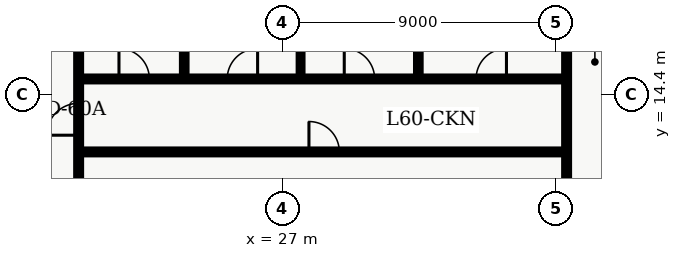
"""IFC4 building model, lengths in metres.
Left out: names, types, materials, properties, quantities, classifications, styles, units other than length and angle.
Written with IfcOpenShell. Run it as: python <this file> out.ifc"""

import sys

from ifc_helpers import new_model, entity, si_unit, converted_unit, direction, frame, origin_with_axes, origin_2d_with_axis, place, context, subcontext, project, spatial, polyline, rectangle, outline, extrude, element, fill, save


model = new_model("IFC4")
c1 = context("Model", 3, precision=1e-05, world=origin_with_axes(), true_north=direction((0.0, 1.0)))
c2 = subcontext(c1, "Body", "Model", "MODEL_VIEW")
j1 = project(units=[si_unit("LENGTHUNIT", "METRE"), converted_unit("PLANEANGLEUNIT", "DEGREE", entity("IfcPlaneAngleMeasure", 0.017), si_unit("PLANEANGLEUNIT", "RADIAN"), dimensions=[0, 0, 0, 0, 0, 0, 0])], contexts=[c1])
p1 = place(None, origin_with_axes())
s1 = spatial("IfcSite", under=j1, at=p1, CompositionType="ELEMENT")
p2 = place(p1, origin_with_axes())
s2 = spatial("IfcBuilding", under=s1, at=p2, CompositionType="ELEMENT")
p3 = place(p2, frame((0.0, 0.0, 244.2), z_axis=(0.0, 0.0, 1.0), x_axis=(1.0, 0.0, 0.0)))
s3 = spatial("IfcBuildingStorey", under=s2, at=p3, CompositionType="ELEMENT", Elevation=244.2)
p4 = place(p3, frame((20.3, 7.8, 0.0), z_axis=(0.0, 0.0, 1.0), x_axis=(0.0, 1.0, 0.0)))
e1 = element("IfcWall", 1, at=p4, inside=s3, PredefinedType="PARTITIONING", context=c2, shape_type="SweptSolid", body=[
    extrude(outline(polyline([(0.0, -0.08), (32.7, -0.08), (32.7, 0.08), (0.0, 0.08), (0.0, -0.08)])), origin_with_axes(), (0.0, 0.0, 1.0), 2.64),
])
p5 = place(p4, frame((17.794, 0.0, 0.0), z_axis=(0.0, 0.0, 1.0), x_axis=(1.0, 0.0, 0.0)))
e2 = element("IfcOpeningElement", 2, at=p5, cuts=e1, PredefinedType="OPENING", context=c2, shape_type="SweptSolid", body=[
    extrude(rectangle(XDim=1.0, YDim=0.18, at=origin_2d_with_axis()), origin_with_axes(), (0.0, 0.0, 1.0), 2.15),
])
p6 = place(p4, frame((22.145, 0.0, 0.0), z_axis=(0.0, 0.0, 1.0), x_axis=(1.0, 0.0, 0.0)))
e3 = element("IfcOpeningElement", 3, at=p6, cuts=e1, PredefinedType="OPENING", context=c2, shape_type="SweptSolid", body=[
    extrude(rectangle(XDim=1.0, YDim=0.18, at=origin_2d_with_axis()), origin_with_axes(), (0.0, 0.0, 1.0), 2.15),
])
p7 = place(p4, frame((26.855, 0.0, 0.0), z_axis=(0.0, 0.0, 1.0), x_axis=(1.0, 0.0, 0.0)))
e4 = element("IfcOpeningElement", 4, at=p7, cuts=e1, PredefinedType="OPENING", context=c2, shape_type="SweptSolid", body=[
    extrude(rectangle(XDim=1.0, YDim=0.18, at=origin_2d_with_axis()), origin_with_axes(), (0.0, 0.0, 1.0), 2.15),
])
p8 = place(p4, frame((5.775, 0.0, 0.0), z_axis=(0.0, 0.0, 1.0), x_axis=(1.0, 0.0, 0.0)))
e5 = element("IfcOpeningElement", 5, at=p8, cuts=e1, PredefinedType="OPENING", context=c2, shape_type="SweptSolid", body=[
    extrude(rectangle(XDim=1.05, YDim=0.18, at=origin_2d_with_axis()), origin_with_axes(), (0.0, 0.0, 1.0), 2.15),
])
p9 = place(p3, frame((20.3, 12.5, 0.0), z_axis=(0.0, 0.0, 1.0), x_axis=(1.0, 0.0, 0.0)))
e6 = element("IfcWall", 6, at=p9, inside=s3, PredefinedType="PARTITIONING", context=c2, shape_type="SweptSolid", body=[
    extrude(outline(polyline([(0.0, -0.08), (16.05, -0.08), (16.05, 0.08), (0.0, 0.08), (0.0, -0.08)])), origin_with_axes(), (0.0, 0.0, 1.0), 2.64),
])
p10 = place(p9, frame((8.075, 0.0, 0.0), z_axis=(0.0, 0.0, 1.0), x_axis=(1.0, 0.0, 0.0)))
e7 = element("IfcOpeningElement", 7, at=p10, cuts=e6, PredefinedType="OPENING", context=c2, shape_type="SweptSolid", body=[
    extrude(rectangle(XDim=1.0, YDim=0.18, at=origin_2d_with_axis()), origin_with_axes(), (0.0, 0.0, 1.0), 2.15),
])
p11 = place(p3, frame((20.3, 14.9, 0.0), z_axis=(0.0, 0.0, 1.0), x_axis=(1.0, 0.0, 0.0)))
e8 = element("IfcWall", 8, at=p11, inside=s3, PredefinedType="PARTITIONING", context=c2, shape_type="SweptSolid", body=[
    extrude(outline(polyline([(0.0, -0.08), (16.05, -0.08), (16.05, 0.08), (0.0, 0.08), (0.0, -0.08)])), origin_with_axes(), (0.0, 0.0, 1.0), 2.64),
])
p12 = place(p11, frame((1.827, 0.0, 0.0), z_axis=(0.0, 0.0, 1.0), x_axis=(1.0, 0.0, 0.0)))
e9 = element("IfcOpeningElement", 9, at=p12, cuts=e8, PredefinedType="OPENING", context=c2, shape_type="SweptSolid", body=[
    extrude(rectangle(XDim=1.0, YDim=0.18, at=origin_2d_with_axis()), origin_with_axes(), (0.0, 0.0, 1.0), 2.15),
])
p13 = place(p11, frame((5.386, 0.0, 0.0), z_axis=(0.0, 0.0, 1.0), x_axis=(1.0, 0.0, 0.0)))
e10 = element("IfcOpeningElement", 10, at=p13, cuts=e8, PredefinedType="OPENING", context=c2, shape_type="SweptSolid", body=[
    extrude(rectangle(XDim=1.0, YDim=0.18, at=origin_2d_with_axis()), origin_with_axes(), (0.0, 0.0, 1.0), 2.15),
])
p14 = place(p11, frame((9.236, 0.0, 0.0), z_axis=(0.0, 0.0, 1.0), x_axis=(1.0, 0.0, 0.0)))
e11 = element("IfcOpeningElement", 11, at=p14, cuts=e8, PredefinedType="OPENING", context=c2, shape_type="SweptSolid", body=[
    extrude(rectangle(XDim=1.0, YDim=0.18, at=origin_2d_with_axis()), origin_with_axes(), (0.0, 0.0, 1.0), 2.15),
])
p15 = place(p11, frame((13.572, 0.0, 0.0), z_axis=(0.0, 0.0, 1.0), x_axis=(1.0, 0.0, 0.0)))
e12 = element("IfcOpeningElement", 12, at=p15, cuts=e8, PredefinedType="OPENING", context=c2, shape_type="SweptSolid", body=[
    extrude(rectangle(XDim=1.0, YDim=0.18, at=origin_2d_with_axis()), origin_with_axes(), (0.0, 0.0, 1.0), 2.15),
])
p16 = place(p3, frame((36.35, 4.35, 0.0), z_axis=(0.0, 0.0, 1.0), x_axis=(0.0, 1.0, 0.0)))
e13 = element("IfcWall", 13, at=p16, inside=s3, PredefinedType="PARTITIONING", context=c2, shape_type="SweptSolid", body=[
    extrude(outline(polyline([(0.0, -0.08), (16.95, -0.08), (16.95, 0.08), (0.0, 0.08), (0.0, -0.08)])), origin_with_axes(), (0.0, 0.0, 1.0), 2.64),
])
p17 = place(p3, frame((23.773, 15.02, 0.0), z_axis=(0.0, 0.0, 1.0), x_axis=(0.0, 1.0, 0.0)))
e14 = element("IfcWall", 14, at=p17, inside=s3, PredefinedType="PARTITIONING", context=c2, shape_type="SweptSolid", body=[
    extrude(outline(polyline([(0.0, -0.075), (6.2, -0.075), (6.2, 0.075), (0.0, 0.075), (0.0, -0.075)])), origin_with_axes(), (0.0, 0.0, 1.0), 2.64),
])
p18 = place(p3, frame((27.6, 15.02, 0.0), z_axis=(0.0, 0.0, 1.0), x_axis=(0.0, 1.0, 0.0)))
e15 = element("IfcWall", 15, at=p18, inside=s3, PredefinedType="PARTITIONING", context=c2, shape_type="SweptSolid", body=[
    extrude(outline(polyline([(0.0, -0.062), (6.2, -0.062), (6.2, 0.062), (0.0, 0.062), (0.0, -0.062)])), origin_with_axes(), (0.0, 0.0, 1.0), 2.64),
])
p19 = place(p3, frame((31.473, 15.02, 0.0), z_axis=(0.0, 0.0, 1.0), x_axis=(0.0, 1.0, 0.0)))
e16 = element("IfcWall", 16, at=p19, inside=s3, PredefinedType="PARTITIONING", context=c2, shape_type="SweptSolid", body=[
    extrude(outline(polyline([(0.0, -0.075), (6.2, -0.075), (6.2, 0.075), (0.0, 0.075), (0.0, -0.075)])), origin_with_axes(), (0.0, 0.0, 1.0), 2.64),
])
p20 = place(p4, frame((5.775, 0.0, 0.0), z_axis=(0.0, 0.0, 1.0), x_axis=(1.0, 0.0, 0.0)))
e17 = element("IfcDoor", 17, at=p20, inside=s3, OperationType="SINGLE_SWING_LEFT", PredefinedType="DOOR", context=c2, shape_type="SweptSolid", body=[
    extrude(rectangle(XDim=1.05, YDim=0.09, at=origin_2d_with_axis()), origin_with_axes(), (0.0, 0.0, 1.0), 2.15),
])
fill(e5, e17)
p21 = place(p9, frame((8.075, 0.0, 0.0), z_axis=(0.0, 0.0, 1.0), x_axis=(1.0, 0.0, 0.0)))
e18 = element("IfcDoor", 18, at=p21, inside=s3, OperationType="SINGLE_SWING_LEFT", PredefinedType="DOOR", context=c2, shape_type="SweptSolid", body=[
    extrude(rectangle(XDim=1.0, YDim=0.09, at=origin_2d_with_axis()), origin_with_axes(), (0.0, 0.0, 1.0), 2.15),
])
fill(e7, e18)
p22 = place(p11, frame((1.827, 0.0, 0.0), z_axis=(0.0, 0.0, 1.0), x_axis=(1.0, 0.0, 0.0)))
e19 = element("IfcDoor", 19, at=p22, inside=s3, OperationType="SINGLE_SWING_LEFT", PredefinedType="DOOR", context=c2, shape_type="SweptSolid", body=[
    extrude(rectangle(XDim=1.0, YDim=0.09, at=origin_2d_with_axis()), origin_with_axes(), (0.0, 0.0, 1.0), 2.15),
])
fill(e9, e19)
p23 = place(p11, frame((5.386, 0.0, 0.0), z_axis=(0.0, 0.0, 1.0), x_axis=(1.0, 0.0, 0.0)))
e20 = element("IfcDoor", 20, at=p23, inside=s3, OperationType="SINGLE_SWING_RIGHT", PredefinedType="DOOR", context=c2, shape_type="SweptSolid", body=[
    extrude(rectangle(XDim=1.0, YDim=0.09, at=origin_2d_with_axis()), origin_with_axes(), (0.0, 0.0, 1.0), 2.15),
])
fill(e10, e20)
p24 = place(p11, frame((9.236, 0.0, 0.0), z_axis=(0.0, 0.0, 1.0), x_axis=(1.0, 0.0, 0.0)))
e21 = element("IfcDoor", 21, at=p24, inside=s3, OperationType="SINGLE_SWING_LEFT", PredefinedType="DOOR", context=c2, shape_type="SweptSolid", body=[
    extrude(rectangle(XDim=1.0, YDim=0.09, at=origin_2d_with_axis()), origin_with_axes(), (0.0, 0.0, 1.0), 2.15),
])
fill(e11, e21)
p25 = place(p11, frame((13.572, 0.0, 0.0), z_axis=(0.0, 0.0, 1.0), x_axis=(1.0, 0.0, 0.0)))
e22 = element("IfcDoor", 22, at=p25, inside=s3, OperationType="SINGLE_SWING_RIGHT", PredefinedType="DOOR", context=c2, shape_type="SweptSolid", body=[
    extrude(rectangle(XDim=1.0, YDim=0.09, at=origin_2d_with_axis()), origin_with_axes(), (0.0, 0.0, 1.0), 2.15),
])
fill(e12, e22)
save(model, sys.argv[1])
